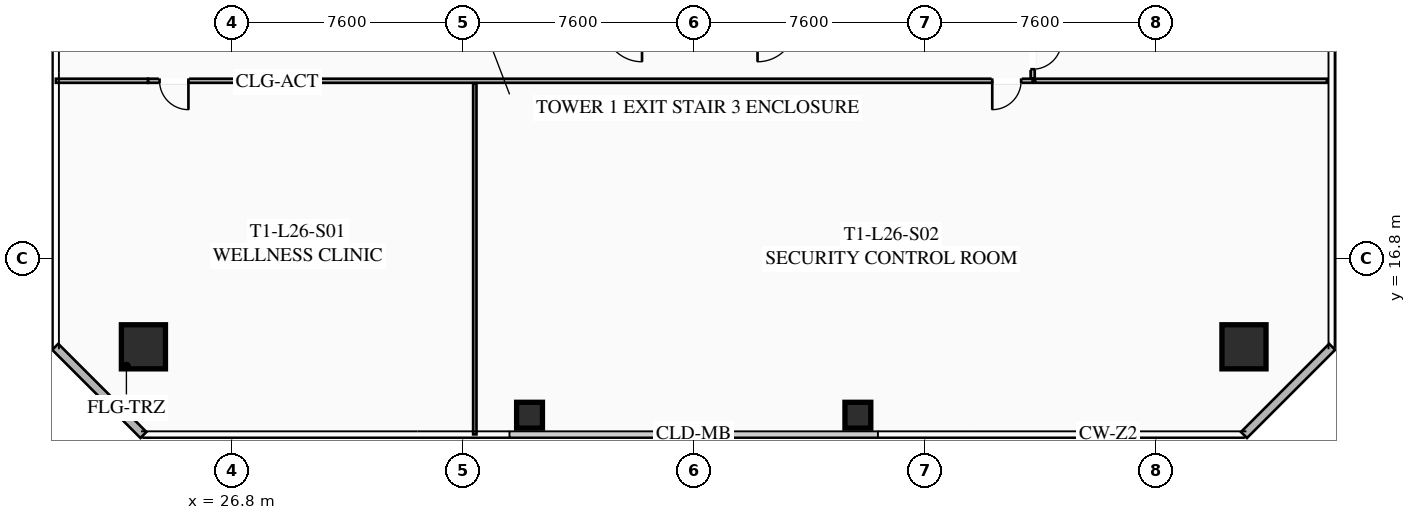
"""IFC4 building model, lengths in metres.
Left out: names, types, materials, properties, quantities, classifications, styles, units other than length and angle.
Written with IfcOpenShell. Run it as: python <this file> out.ifc"""

import sys

from ifc_helpers import new_model, si_unit, direction, frame, frame_2d, origin, origin_2d, place, context, subcontext, project, spatial, rectangle, hollow_rectangle, extrude, element, fill, save


model = new_model("IFC4")
c1 = context("Model", 3, precision=1e-05, world=origin(), true_north=direction((0.0, 1.0)))
c2 = subcontext(c1, "Body", "Model", "MODEL_VIEW")
j1 = project(units=[si_unit("LENGTHUNIT", "METRE"), si_unit("PLANEANGLEUNIT", "RADIAN")], contexts=[c1])
p1 = place(None, origin())
s1 = spatial("IfcSite", under=j1, at=p1, CompositionType="ELEMENT")
p2 = place(p1, origin())
s2 = spatial("IfcBuilding", under=s1, at=p2, CompositionType="ELEMENT")
p3 = place(p2, frame((0.0, 0.0, 99.15)))
s3 = spatial("IfcBuildingStorey", under=s2, at=p3, CompositionType="ELEMENT", Elevation=99.15)
for number, where, z_axis, x_axis in (
    (1, (23.9, 13.9, 0.0), (0.0, 0.0, 1.0), (1.0, 0.0, 0.0)),
    (2, (60.1, 13.9, 0.0), (0.0, 0.0, 1.0), (1.0, 0.0, 0.0)),
):
    element("IfcColumn", number, at=place(p3, frame(where, z_axis=z_axis, x_axis=x_axis)), inside=s3, PredefinedType="COLUMN", context=c2, shape_type="SweptSolid", body=[
        extrude(hollow_rectangle(XDim=1.45, YDim=1.45, WallThickness=0.055, at=origin_2d()), origin(), (0.0, 0.0, 1.0), 3.35),
    ])
for number, where, z_axis, x_axis in (
    (3, (36.6, 11.65, 0.0), (0.0, 0.0, 1.0), (1.0, 0.0, 0.0)),
    (4, (47.4, 11.65, 0.0), (0.0, 0.0, 1.0), (1.0, 0.0, 0.0)),
):
    element("IfcColumn", number, at=place(p3, frame(where, z_axis=z_axis, x_axis=x_axis)), inside=s3, PredefinedType="COLUMN", context=c2, shape_type="SweptSolid", body=[
        extrude(hollow_rectangle(XDim=0.85, YDim=0.85, WallThickness=0.035, at=origin_2d()), origin(), (0.0, 0.0, 1.0), 3.35),
    ])
for number, where, z_axis, x_axis in (
    (5, (23.9, 11.0, 0.0), (0.0, 0.0, 1.0), (-0.707, 0.707, 0.0)),
    (6, (63.0, 13.9, 0.0), (0.0, 0.0, 1.0), (-0.707, -0.707, 0.0)),
):
    element("IfcWall", number, at=place(p3, frame(where, z_axis=z_axis, x_axis=x_axis)), inside=s3, PredefinedType="SOLIDWALL", context=c2, shape_type="SweptSolid", body=[
        extrude(rectangle(XDim=4.101, YDim=0.28, at=frame_2d((2.051, 0.0))), origin(), (0.0, 0.0, 1.0), 3.35),
    ])
p4 = place(p3, frame((53.15, 22.65, 0.0), z_axis=(0.0, 0.0, 1.0), x_axis=(-1.0, 0.0, 0.0)))
e7 = element("IfcWall", 7, at=p4, inside=s3, PredefinedType="PARTITIONING", context=c2, shape_type="SweptSolid", body=[
    extrude(rectangle(XDim=29.1, YDim=0.135, at=frame_2d((14.55, 0.0))), origin(), (0.0, 0.0, 1.0), 2.703),
])
p5 = place(p4, frame((27.77, 0.0, 0.0)))
e8 = element("IfcOpeningElement", 8, at=p5, cuts=e7, PredefinedType="OPENING", context=c2, shape_type="SweptSolid", body=[
    extrude(rectangle(XDim=0.95, YDim=2.05, at=frame_2d((0.475, 1.025))), frame((0.0, 0.077, 0.0), z_axis=(0.0, -1.0, 0.0), x_axis=(1.0, 0.0, 0.0)), (0.0, 0.0, 1.0), 0.155),
])
p6 = place(p4, frame((0.38, 0.0, 0.0)))
e9 = element("IfcOpeningElement", 9, at=p6, cuts=e7, PredefinedType="OPENING", context=c2, shape_type="SweptSolid", body=[
    extrude(rectangle(XDim=0.95, YDim=2.05, at=frame_2d((0.475, 1.025))), frame((0.0, 0.077, 0.0), z_axis=(0.0, -1.0, 0.0), x_axis=(1.0, 0.0, 0.0)), (0.0, 0.0, 1.0), 0.155),
])
p7 = place(p3, frame((21.02, 22.65, 0.0), z_axis=(0.0, 0.0, 1.0), x_axis=(1.0, 0.0, 0.0)))
e10 = element("IfcWall", 10, at=p7, inside=s3, PredefinedType="PARTITIONING", context=c2, shape_type="SweptSolid", body=[
    extrude(rectangle(XDim=3.03, YDim=0.135, at=frame_2d((1.515, 0.0))), origin(), (0.0, 0.0, 1.0), 2.703),
])
p8 = place(p3, frame((34.8, 11.02, 0.0), z_axis=(0.0, 0.0, 1.0), x_axis=(0.0, 1.0, 0.0)))
e11 = element("IfcWall", 11, at=p8, inside=s3, PredefinedType="PARTITIONING", context=c2, shape_type="SweptSolid", body=[
    extrude(rectangle(XDim=11.55, YDim=0.11, at=frame_2d((5.775, 0.0))), origin(), (0.0, 0.0, 1.0), 2.703),
])
p9 = place(p3, frame((53.15, 42.34, 0.0), z_axis=(0.0, 0.0, 1.0), x_axis=(0.0, -1.0, 0.0)))
e12 = element("IfcWall", 12, at=p9, inside=s3, PredefinedType="PARTITIONING", context=c2, shape_type="SweptSolid", body=[
    extrude(rectangle(XDim=19.61, YDim=0.135, at=frame_2d((9.805, 0.0))), origin(), (0.0, 0.0, 1.0), 2.703),
])
p10 = place(p9, frame((18.36, 0.0, 0.0)))
e13 = element("IfcOpeningElement", 13, at=p10, cuts=e12, PredefinedType="OPENING", context=c2, shape_type="SweptSolid", body=[
    extrude(rectangle(XDim=0.95, YDim=2.05, at=frame_2d((0.475, 1.025))), frame((0.0, 0.077, 0.0), z_axis=(0.0, -1.0, 0.0), x_axis=(1.0, 0.0, 0.0)), (0.0, 0.0, 1.0), 0.155),
])
p11 = place(p9, frame((9.666, 0.0, 0.0)))
e14 = element("IfcOpeningElement", 14, at=p11, cuts=e12, PredefinedType="OPENING", context=c2, shape_type="SweptSolid", body=[
    extrude(rectangle(XDim=0.95, YDim=2.05, at=frame_2d((0.475, 1.025))), frame((0.0, 0.077, 0.0), z_axis=(0.0, -1.0, 0.0), x_axis=(1.0, 0.0, 0.0)), (0.0, 0.0, 1.0), 0.155),
])
p12 = place(p3, frame((53.23, 22.65, 0.0), z_axis=(0.0, 0.0, 1.0), x_axis=(1.0, 0.0, 0.0)))
e15 = element("IfcWall", 15, at=p12, inside=s3, PredefinedType="PARTITIONING", context=c2, shape_type="SweptSolid", body=[
    extrude(rectangle(XDim=9.6, YDim=0.135, at=frame_2d((4.8, 0.0))), origin(), (0.0, 0.0, 1.0), 2.703),
])
p13 = place(p5, origin())
e16 = element("IfcDoor", 16, at=p13, inside=s3, OperationType="SINGLE_SWING_LEFT", PredefinedType="DOOR", context=c2, shape_type="SweptSolid", body=[
    extrude(rectangle(XDim=0.95, YDim=2.05, at=frame_2d((0.475, 1.025))), frame((0.0, 0.025, 0.0), z_axis=(0.0, -1.0, 0.0), x_axis=(1.0, 0.0, 0.0)), (0.0, 0.0, 1.0), 0.05),
])
fill(e8, e16)
p14 = place(p6, origin())
e17 = element("IfcDoor", 17, at=p14, inside=s3, OperationType="SINGLE_SWING_RIGHT", PredefinedType="DOOR", context=c2, shape_type="SweptSolid", body=[
    extrude(rectangle(XDim=0.95, YDim=2.05, at=frame_2d((0.475, 1.025))), frame((0.0, 0.025, 0.0), z_axis=(0.0, -1.0, 0.0), x_axis=(1.0, 0.0, 0.0)), (0.0, 0.0, 1.0), 0.05),
])
fill(e9, e17)
p15 = place(p10, origin())
e18 = element("IfcDoor", 18, at=p15, inside=s3, OperationType="SINGLE_SWING_LEFT", PredefinedType="DOOR", context=c2, shape_type="SweptSolid", body=[
    extrude(rectangle(XDim=0.95, YDim=2.05, at=frame_2d((0.475, 1.025))), frame((0.0, 0.025, 0.0), z_axis=(0.0, -1.0, 0.0), x_axis=(1.0, 0.0, 0.0)), (0.0, 0.0, 1.0), 0.05),
])
fill(e13, e18)
save(model, sys.argv[1])
